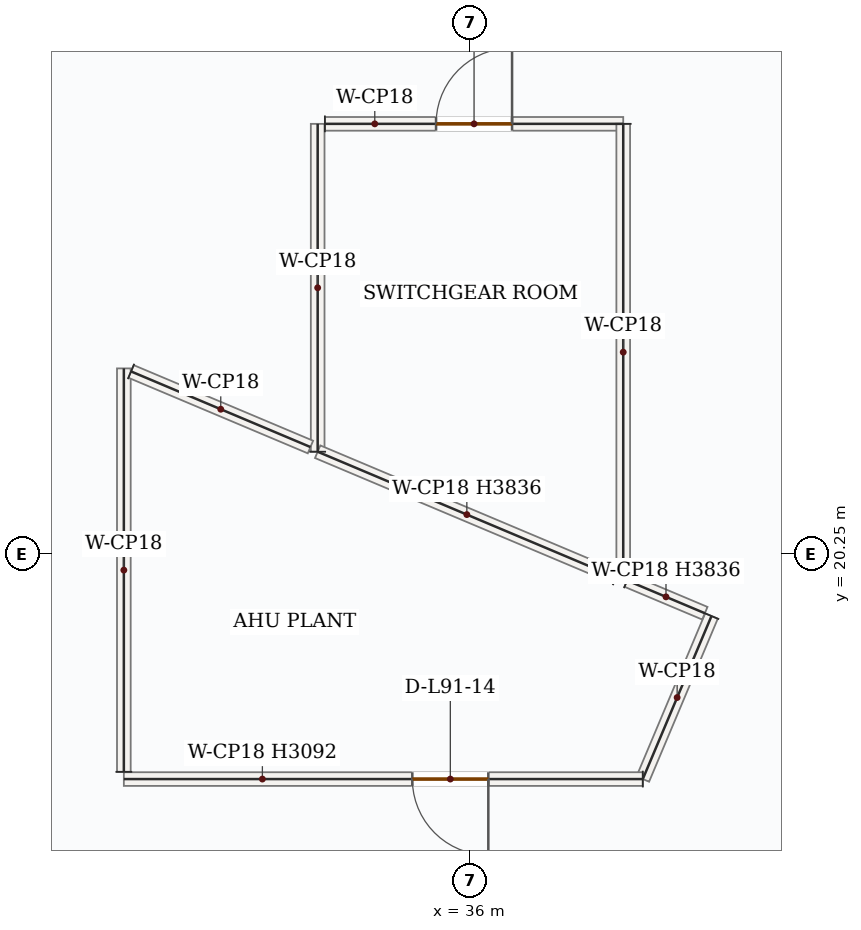
"""IFC4 building model, lengths in metres.
Left out: names, types, materials, properties, quantities, classifications, styles, units other than length and angle.
Written with IfcOpenShell. Run it as: python <this file> out.ifc"""

import sys

from ifc_helpers import new_model, si_unit, direction, frame, frame_2d, origin, place, context, subcontext, project, spatial, rectangle, extrude, source, transform, mapped, element, fill, save


model = new_model("IFC4")
c1 = context("Model", 3, precision=1e-05, world=origin(), true_north=direction((0.0, 1.0)))
c2 = subcontext(c1, "Body", "Model", "MODEL_VIEW")
j1 = project(units=[si_unit("LENGTHUNIT", "METRE"), si_unit("PLANEANGLEUNIT", "RADIAN")], contexts=[c1])
p1 = place(None, origin())
s1 = spatial("IfcSite", under=j1, at=p1, CompositionType="ELEMENT")
p2 = place(p1, origin())
s2 = spatial("IfcBuilding", under=s1, at=p2, CompositionType="ELEMENT")
p3 = place(p2, frame((0.0, 0.0, 375.15)))
s3 = spatial("IfcBuildingStorey", under=s2, at=p3, CompositionType="ELEMENT", Elevation=375.15)
m1 = source(origin(), c2, "Body", "SweptSolid", [
    extrude(rectangle(XDim=4.313, YDim=0.18, at=frame_2d((2.157, 0.0))), origin(), (0.0, 0.0, 1.0), 4.25),
])
p4 = place(p3, frame((33.99, 21.596, 0.0), z_axis=(0.0, 0.0, 1.0), x_axis=(0.0, 1.0, 0.0)))
e1 = element("IfcWall", 1, at=p4, inside=s3, PredefinedType="PARTITIONING", context=c2, shape_type="MappedRepresentation", body=[
    mapped(m1, transform((0.0, 0.0, 0.0), x_axis=(1.0, 0.0, 0.0), y_axis=(0.0, 1.0, 0.0), z_axis=(0.0, 0.0, 1.0), scale=1.0)),
])
p5 = place(p3, frame((34.085, 25.91, 0.0), z_axis=(0.0, 0.0, 1.0), x_axis=(1.0, 0.0, 0.0)))
e2 = element("IfcWall", 2, at=p5, inside=s3, PredefinedType="PARTITIONING", context=c2, shape_type="SweptSolid", body=[
    extrude(rectangle(XDim=3.925, YDim=0.18, at=frame_2d((1.962, 0.0))), origin(), (0.0, 0.0, 1.0), 4.25),
])
p6 = place(p5, frame((1.462, 0.0, 0.0)))
e3 = element("IfcOpeningElement", 3, at=p6, cuts=e2, PredefinedType="OPENING", context=c2, shape_type="SweptSolid", body=[
    extrude(rectangle(XDim=1.0, YDim=2.15, at=frame_2d((0.5, 1.075))), frame((0.0, 0.1, 0.0), z_axis=(0.0, -1.0, 0.0), x_axis=(1.0, 0.0, 0.0)), (0.0, 0.0, 1.0), 0.2),
])
m2 = source(origin(), c2, "Body", "SweptSolid", [
    extrude(rectangle(XDim=6.007, YDim=0.18, at=frame_2d((3.004, 0.0))), origin(), (0.0, 0.0, 1.0), 4.25),
])
p7 = place(p3, frame((38.01, 25.91, 0.0), z_axis=(0.0, 0.0, 1.0), x_axis=(0.0, -1.0, 0.0)))
e4 = element("IfcWall", 4, at=p7, inside=s3, PredefinedType="PARTITIONING", context=c2, shape_type="MappedRepresentation", body=[
    mapped(m2, transform((0.0, 0.0, 0.0), x_axis=(1.0, 0.0, 0.0), y_axis=(0.0, 1.0, 0.0), z_axis=(0.0, 0.0, 1.0), scale=1.0)),
])
m3 = source(origin(), c2, "Body", "SweptSolid", [
    extrude(rectangle(XDim=4.259, YDim=0.18, at=frame_2d((2.13, 0.0))), origin(), (0.0, 0.0, 1.0), 3.836),
])
p8 = place(p3, frame((37.915, 19.942, 0.0), z_axis=(0.0, 0.0, 1.0), x_axis=(-0.921517727691, 0.388336294403, 0.0)))
e5 = element("IfcWall", 5, at=p8, inside=s3, PredefinedType="PARTITIONING", context=c2, shape_type="MappedRepresentation", body=[
    mapped(m3, transform((0.0, 0.0, 0.0), x_axis=(1.0, 0.0, 0.0), y_axis=(0.0, 1.0, 0.0), z_axis=(0.0, 0.0, 1.0), scale=1.0)),
])
m4 = source(origin(), c2, "Body", "SweptSolid", [
    extrude(rectangle(XDim=2.327, YDim=0.18, at=frame_2d((1.164, 0.0))), origin(), (0.0, 0.0, 1.0), 4.25),
])
p9 = place(p3, frame((39.171, 19.435, 0.0), z_axis=(0.0, 0.0, 1.0), x_axis=(-0.388328975107, -0.921520812078, 0.0)))
e6 = element("IfcWall", 6, at=p9, inside=s3, PredefinedType="PARTITIONING", context=c2, shape_type="MappedRepresentation", body=[
    mapped(m4, transform((0.0, 0.0, 0.0), x_axis=(1.0, 0.0, 0.0), y_axis=(0.0, 1.0, 0.0), z_axis=(0.0, 0.0, 1.0), scale=1.0)),
])
p10 = place(p3, frame((38.267, 17.29, 0.0), z_axis=(0.0, 0.0, 1.0), x_axis=(-1.0, 0.0, 0.0)))
e7 = element("IfcWall", 7, at=p10, inside=s3, PredefinedType="PARTITIONING", context=c2, shape_type="SweptSolid", body=[
    extrude(rectangle(XDim=6.827, YDim=0.18, at=frame_2d((3.414, 0.0))), origin(), (0.0, 0.0, 1.0), 3.092),
])
p11 = place(p10, frame((2.032, 0.0, 0.0)))
e8 = element("IfcOpeningElement", 8, at=p11, cuts=e7, PredefinedType="OPENING", context=c2, shape_type="SweptSolid", body=[
    extrude(rectangle(XDim=1.0, YDim=2.15, at=frame_2d((0.5, 1.075))), frame((0.0, 0.1, 0.0), z_axis=(0.0, -1.0, 0.0), x_axis=(1.0, 0.0, 0.0)), (0.0, 0.0, 1.0), 0.2),
])
m5 = source(origin(), c2, "Body", "SweptSolid", [
    extrude(rectangle(XDim=5.308, YDim=0.18, at=frame_2d((2.654, 0.0))), origin(), (0.0, 0.0, 1.0), 4.25),
])
p12 = place(p3, frame((31.44, 17.385, 0.0), z_axis=(0.0, 0.0, 1.0), x_axis=(0.0, 1.0, 0.0)))
e9 = element("IfcWall", 9, at=p12, inside=s3, PredefinedType="PARTITIONING", context=c2, shape_type="MappedRepresentation", body=[
    mapped(m5, transform((0.0, 0.0, 0.0), x_axis=(1.0, 0.0, 0.0), y_axis=(0.0, 1.0, 0.0), z_axis=(0.0, 0.0, 1.0), scale=1.0)),
])
m6 = source(origin(), c2, "Body", "SweptSolid", [
    extrude(rectangle(XDim=2.561, YDim=0.18, at=frame_2d((1.281, 0.0))), origin(), (0.0, 0.0, 1.0), 4.25),
])
p13 = place(p3, frame((31.535, 22.653, 0.0), z_axis=(0.0, 0.0, 1.0), x_axis=(0.921543833829, -0.388274339008, 0.0)))
e10 = element("IfcWall", 10, at=p13, inside=s3, PredefinedType="PARTITIONING", context=c2, shape_type="MappedRepresentation", body=[
    mapped(m6, transform((0.0, 0.0, 0.0), x_axis=(1.0, 0.0, 0.0), y_axis=(0.0, 1.0, 0.0), z_axis=(0.0, 0.0, 1.0), scale=1.0)),
])
m7 = source(origin(), c2, "Body", "SweptSolid", [
    extrude(rectangle(XDim=1.109, YDim=0.18, at=frame_2d((0.555, 0.0))), origin(), (0.0, 0.0, 1.0), 3.836),
])
p14 = place(p3, frame((38.062, 19.903, 0.0), z_axis=(0.0, 0.0, 1.0), x_axis=(0.921473730863, -0.388440681866, 0.0)))
e11 = element("IfcWall", 11, at=p14, inside=s3, PredefinedType="PARTITIONING", context=c2, shape_type="MappedRepresentation", body=[
    mapped(m7, transform((0.0, 0.0, 0.0), x_axis=(1.0, 0.0, 0.0), y_axis=(0.0, 1.0, 0.0), z_axis=(0.0, 0.0, 1.0), scale=1.0)),
])
m8 = source(origin(), c2, "Body", "SweptSolid", [
    extrude(rectangle(XDim=1.0, YDim=2.15, at=frame_2d((0.5, 1.075))), frame((0.0, 0.025, 0.0), z_axis=(0.0, -1.0, 0.0), x_axis=(1.0, 0.0, 0.0)), (0.0, 0.0, 1.0), 0.05),
])
p15 = place(p11, origin())
e12 = element("IfcDoor", 12, at=p15, inside=s3, OperationType="SINGLE_SWING_LEFT", PredefinedType="DOOR", context=c2, shape_type="MappedRepresentation", body=[
    mapped(m8, transform((0.0, 0.0, 0.0), x_axis=(1.0, 0.0, 0.0), y_axis=(0.0, 1.0, 0.0), z_axis=(0.0, 0.0, 1.0), scale=1.0)),
])
fill(e8, e12)
p16 = place(p6, origin())
e13 = element("IfcDoor", 13, at=p16, inside=s3, OperationType="SINGLE_SWING_RIGHT", PredefinedType="DOOR", context=c2, shape_type="MappedRepresentation", body=[
    mapped(m8, transform((0.0, 0.0, 0.0), x_axis=(1.0, 0.0, 0.0), y_axis=(0.0, 1.0, 0.0), z_axis=(0.0, 0.0, 1.0), scale=1.0)),
])
fill(e3, e13)
save(model, sys.argv[1])
